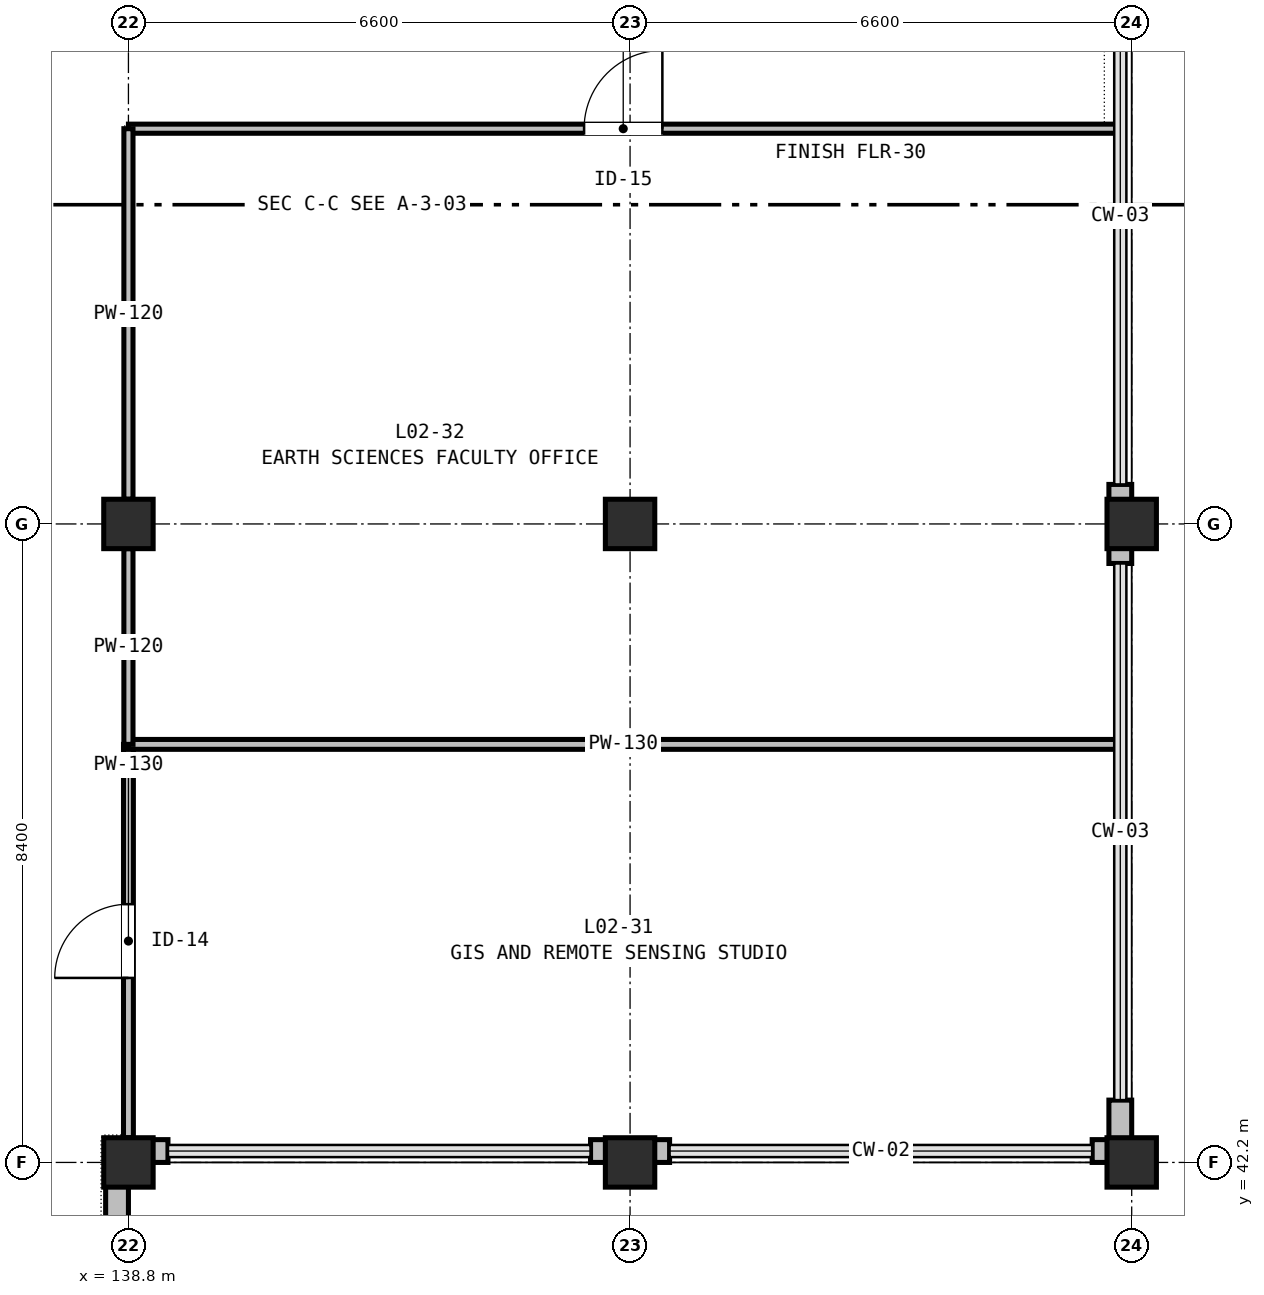
"""IFC4 building model, lengths in metres.
Left out: names, types, materials, properties, quantities, classifications, styles, units other than length and angle.
Written with IfcOpenShell. Run it as: python <this file> out.ifc"""

import sys

from ifc_helpers import new_model, si_unit, direction, frame, frame_2d, origin, origin_2d, place, context, subcontext, project, spatial, rectangle, extrude, element, fill, save


model = new_model("IFC4")
c1 = context("Model", 3, precision=1e-05, world=origin(), true_north=direction((0.0, 1.0)))
c2 = subcontext(c1, "Body", "Model", "MODEL_VIEW")
j1 = project(units=[si_unit("LENGTHUNIT", "METRE"), si_unit("PLANEANGLEUNIT", "RADIAN")], contexts=[c1])
p1 = place(None, origin())
s1 = spatial("IfcSite", under=j1, at=p1, CompositionType="ELEMENT")
p2 = place(p1, origin())
s2 = spatial("IfcBuilding", under=s1, at=p2, CompositionType="ELEMENT")
p3 = place(p2, frame((0.0, 0.0, 10.2)))
s3 = spatial("IfcBuildingStorey", under=s2, at=p3, CompositionType="ELEMENT", Elevation=10.2)
for number, where, z_axis, x_axis in (
    (1, (138.8, 42.2, 0.0), (0.0, 0.0, 1.0), (1.0, 0.0, 0.0)),
    (2, (138.8, 50.6, 0.0), (0.0, 0.0, 1.0), (1.0, 0.0, 0.0)),
    (3, (145.4, 42.2, 0.0), (0.0, 0.0, 1.0), (1.0, 0.0, 0.0)),
    (4, (145.4, 50.6, 0.0), (0.0, 0.0, 1.0), (1.0, 0.0, 0.0)),
    (5, (152.0, 42.2, 0.0), (0.0, 0.0, 1.0), (1.0, 0.0, 0.0)),
    (6, (152.0, 50.6, 0.0), (0.0, 0.0, 1.0), (1.0, 0.0, 0.0)),
):
    element("IfcColumn", number, at=place(p3, frame(where, z_axis=z_axis, x_axis=x_axis)), inside=s3, PredefinedType="COLUMN", context=c2, shape_type="SweptSolid", body=[
        extrude(rectangle(XDim=0.65, YDim=0.65, at=origin_2d()), origin(), (0.0, 0.0, 1.0), 4.8),
    ])
for number, where, z_axis, x_axis in (
    (7, (151.85, 51.12, 0.0), (0.0, 0.0, 1.0), (0.0, -1.0, 0.0)),
    (8, (151.85, 50.6, 0.0), (0.0, 0.0, 1.0), (0.0, -1.0, 0.0)),
    (9, (151.85, 43.02, 0.0), (0.0, 0.0, 1.0), (0.0, -1.0, 0.0)),
):
    element("IfcWall", number, at=place(p3, frame(where, z_axis=z_axis, x_axis=x_axis)), inside=s3, PredefinedType="STANDARD", context=c2, shape_type="SweptSolid", body=[
        extrude(rectangle(XDim=0.52, YDim=0.3, at=frame_2d((0.26, 0.0))), origin(), (0.0, 0.0, 1.0), 4.085),
    ])
for number, where, z_axis, x_axis in (
    (10, (152.0, 42.35, 0.0), (0.0, 0.0, 1.0), (-1.0, 0.0, 0.0)),
    (11, (145.92, 42.35, 0.0), (0.0, 0.0, 1.0), (-1.0, 0.0, 0.0)),
    (12, (145.4, 42.35, 0.0), (0.0, 0.0, 1.0), (-1.0, 0.0, 0.0)),
    (13, (139.32, 42.35, 0.0), (0.0, 0.0, 1.0), (-1.0, 0.0, 0.0)),
    (14, (138.65, 41.9, 0.0), (0.0, 0.0, 1.0), (0.0, -1.0, 0.0)),
):
    element("IfcWall", number, at=place(p3, frame(where, z_axis=z_axis, x_axis=x_axis)), inside=s3, PredefinedType="STANDARD", context=c2, shape_type="SweptSolid", body=[
        extrude(rectangle(XDim=0.52, YDim=0.3, at=frame_2d((0.26, 0.0))), origin(), (0.0, 0.0, 1.0), 3.935),
    ])
p4 = place(p3, frame((138.8, 42.525, 0.0), z_axis=(0.0, 0.0, 1.0), x_axis=(0.0, 1.0, 0.0)))
e15 = element("IfcWall", 15, at=p4, inside=s3, PredefinedType="PARTITIONING", context=c2, shape_type="SweptSolid", body=[
    extrude(rectangle(XDim=5.175, YDim=0.13, at=frame_2d((2.587, 0.0))), origin(), (0.0, 0.0, 1.0), 3.935),
])
p5 = place(p4, frame((2.103, 0.0, 0.0)))
e16 = element("IfcOpeningElement", 16, at=p5, cuts=e15, PredefinedType="OPENING", context=c2, shape_type="SweptSolid", body=[
    extrude(rectangle(XDim=0.97, YDim=2.1, at=frame_2d((0.485, 1.05))), frame((0.0, 0.075, 0.0), z_axis=(0.0, -1.0, 0.0), x_axis=(1.0, 0.0, 0.0)), (0.0, 0.0, 1.0), 0.15),
])
p6 = place(p3, frame((138.8, 47.7, 0.0), z_axis=(0.0, 0.0, 1.0), x_axis=(1.0, 0.0, 0.0)))
e17 = element("IfcWall", 17, at=p6, inside=s3, PredefinedType="PARTITIONING", context=c2, shape_type="SweptSolid", body=[
    extrude(rectangle(XDim=13.02, YDim=0.13, at=frame_2d((6.51, 0.0))), origin(), (0.0, 0.0, 1.0), 3.935),
])
p7 = place(p3, frame((138.8, 55.8, 0.0), z_axis=(0.0, 0.0, 1.0), x_axis=(1.0, 0.0, 0.0)))
e18 = element("IfcWall", 18, at=p7, inside=s3, PredefinedType="PARTITIONING", context=c2, shape_type="SweptSolid", body=[
    extrude(rectangle(XDim=13.02, YDim=0.12, at=frame_2d((6.51, 0.0))), origin(), (0.0, 0.0, 1.0), 3.935),
])
p8 = place(p7, frame((5.995, 0.0, 0.0)))
e19 = element("IfcOpeningElement", 19, at=p8, cuts=e18, PredefinedType="OPENING", context=c2, shape_type="SweptSolid", body=[
    extrude(rectangle(XDim=1.03, YDim=2.1, at=frame_2d((0.515, 1.05))), frame((0.0, 0.07, 0.0), z_axis=(0.0, -1.0, 0.0), x_axis=(1.0, 0.0, 0.0)), (0.0, 0.0, 1.0), 0.14),
])
p9 = place(p3, frame((138.8, 47.7, 0.0), z_axis=(0.0, 0.0, 1.0), x_axis=(0.0, 1.0, 0.0)))
e20 = element("IfcWall", 20, at=p9, inside=s3, PredefinedType="PARTITIONING", context=c2, shape_type="SweptSolid", body=[
    extrude(rectangle(XDim=2.575, YDim=0.12, at=frame_2d((1.288, 0.0))), origin(), (0.0, 0.0, 1.0), 3.935),
])
p10 = place(p3, frame((138.8, 50.925, 0.0), z_axis=(0.0, 0.0, 1.0), x_axis=(0.0, 1.0, 0.0)))
e21 = element("IfcWall", 21, at=p10, inside=s3, PredefinedType="PARTITIONING", context=c2, shape_type="SweptSolid", body=[
    extrude(rectangle(XDim=4.875, YDim=0.12, at=frame_2d((2.438, 0.0))), origin(), (0.0, 0.0, 1.0), 3.935),
])
p11 = place(p5, origin())
e22 = element("IfcDoor", 22, at=p11, inside=s3, OperationType="SINGLE_SWING_LEFT", PredefinedType="DOOR", context=c2, shape_type="SweptSolid", body=[
    extrude(rectangle(XDim=0.97, YDim=2.1, at=frame_2d((0.485, 1.05))), frame((0.0, 0.025, 0.0), z_axis=(0.0, -1.0, 0.0), x_axis=(1.0, 0.0, 0.0)), (0.0, 0.0, 1.0), 0.05),
])
fill(e16, e22)
p12 = place(p8, origin())
e23 = element("IfcDoor", 23, at=p12, inside=s3, OperationType="SINGLE_SWING_RIGHT", PredefinedType="DOOR", context=c2, shape_type="SweptSolid", body=[
    extrude(rectangle(XDim=1.03, YDim=2.1, at=frame_2d((0.515, 1.05))), frame((0.0, 0.025, 0.0), z_axis=(0.0, -1.0, 0.0), x_axis=(1.0, 0.0, 0.0)), (0.0, 0.0, 1.0), 0.05),
])
fill(e19, e23)
save(model, sys.argv[1])
